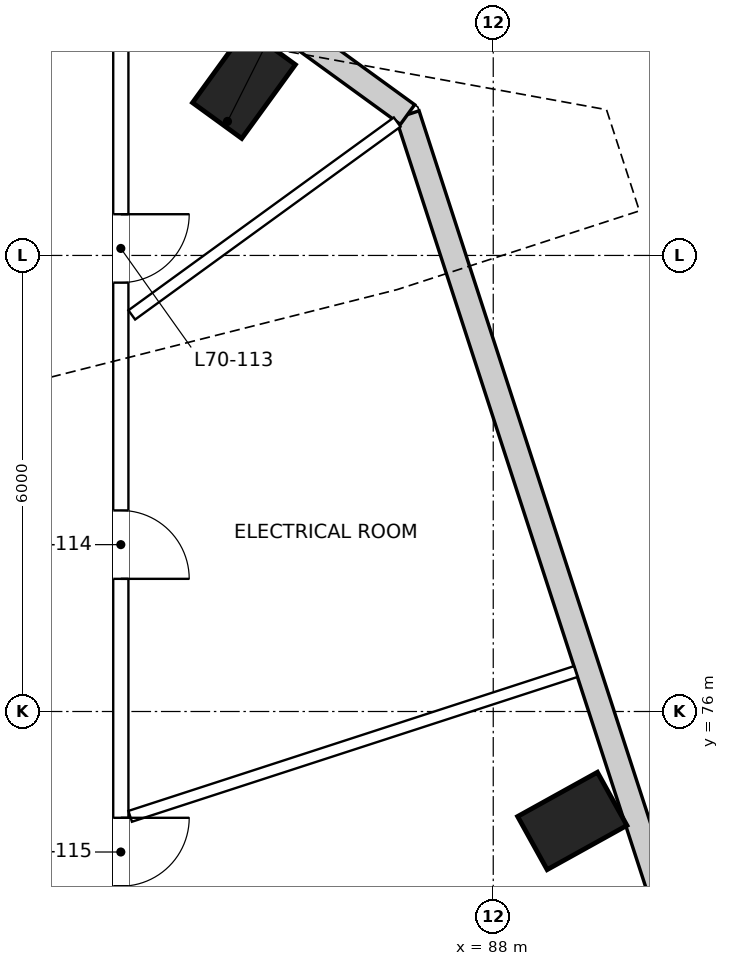
"""IFC4 building model, lengths in metres.
Left out: names, types, materials, properties, quantities, classifications, styles, units other than length and angle.
Written with IfcOpenShell. Run it as: python <this file> out.ifc"""

import sys

from ifc_helpers import new_model, si_unit, direction, frame, frame_2d, origin, origin_2d, place, context, subcontext, project, spatial, rectangle, extrude, element, fill, save


model = new_model("IFC4")
c1 = context("Model", 3, precision=1e-05, world=origin(), true_north=direction((0.0, 1.0)))
c2 = subcontext(c1, "Body", "Model", "MODEL_VIEW")
j1 = project(units=[si_unit("LENGTHUNIT", "METRE"), si_unit("PLANEANGLEUNIT", "RADIAN")], contexts=[c1])
p1 = place(None, origin())
s1 = spatial("IfcSite", under=j1, at=p1, CompositionType="ELEMENT")
p2 = place(p1, origin())
s2 = spatial("IfcBuilding", under=s1, at=p2, CompositionType="ELEMENT")
p3 = place(p2, frame((0.0, 0.0, 295.1)))
s3 = spatial("IfcBuildingStorey", under=s2, at=p3, CompositionType="ELEMENT", Elevation=295.1)
for number, where, z_axis, x_axis in (
    (1, (89.04, 74.56, 0.0), (0.0, 0.0, 1.0), (0.485, -0.875, 0.0)),
    (2, (84.72, 84.26, 0.0), (0.0, 0.0, 1.0), (0.809, -0.588, 0.0)),
):
    element("IfcColumn", number, at=place(p3, frame(where, z_axis=z_axis, x_axis=x_axis)), inside=s3, PredefinedType="COLUMN", context=c2, shape_type="SweptSolid", body=[
        extrude(rectangle(XDim=0.8, YDim=1.2, at=origin_2d()), origin(), (0.0, 0.0, 1.0), 5.0),
    ])
p4 = place(p3, frame((92.529, 66.443, 0.0), z_axis=(0.0, 0.0, 1.0), x_axis=(-0.30902093442, 0.951055236088, 0.0)))
e3 = element("IfcWall", 3, at=p4, inside=s3, PredefinedType="SOLIDWALL", context=c2, shape_type="SweptSolid", body=[
    extrude(rectangle(XDim=18.306, YDim=0.32, at=frame_2d((9.153, 0.0))), origin(), (0.0, 0.0, 1.0), 4.6),
])
p5 = place(p3, frame((86.872, 83.854, 0.0), z_axis=(0.0, 0.0, 1.0), x_axis=(-0.809017735842, 0.587784231749, 0.0)))
e4 = element("IfcWall", 4, at=p5, inside=s3, PredefinedType="SOLIDWALL", context=c2, shape_type="SweptSolid", body=[
    extrude(rectangle(XDim=6.782, YDim=0.32, at=frame_2d((3.391, 0.0))), origin(), (0.0, 0.0, 1.0), 4.6),
])
p6 = place(p3, frame((83.1, 86.396, 0.0), z_axis=(0.0, 0.0, 1.0), x_axis=(0.0, -1.0, 0.0)))
e5 = element("IfcWall", 5, at=p6, inside=s3, PredefinedType="PARTITIONING", context=c2, shape_type="SweptSolid", body=[
    extrude(rectangle(XDim=14.347, YDim=0.2, at=frame_2d((7.173, 0.0))), origin(), (0.0, 0.0, 1.0), 4.15),
])
p7 = place(p6, frame((3.854, 0.0, 0.0)))
e6 = element("IfcOpeningElement", 6, at=p7, cuts=e5, PredefinedType="OPENING", context=c2, shape_type="SweptSolid", body=[
    extrude(rectangle(XDim=0.9, YDim=2.1, at=frame_2d((0.45, 1.05))), frame((0.0, 0.11, 0.0), z_axis=(0.0, -1.0, 0.0), x_axis=(1.0, 0.0, 0.0)), (0.0, 0.0, 1.0), 0.22),
])
p8 = place(p6, frame((7.751, 0.0, 0.0)))
e7 = element("IfcOpeningElement", 7, at=p8, cuts=e5, PredefinedType="OPENING", context=c2, shape_type="SweptSolid", body=[
    extrude(rectangle(XDim=0.9, YDim=2.1, at=frame_2d((0.45, 1.05))), frame((0.0, 0.11, 0.0), z_axis=(0.0, -1.0, 0.0), x_axis=(1.0, 0.0, 0.0)), (0.0, 0.0, 1.0), 0.22),
])
p9 = place(p6, frame((11.795, 0.0, 0.0)))
e8 = element("IfcOpeningElement", 8, at=p9, cuts=e5, PredefinedType="OPENING", context=c2, shape_type="SweptSolid", body=[
    extrude(rectangle(XDim=0.9, YDim=2.1, at=frame_2d((0.45, 1.05))), frame((0.0, 0.11, 0.0), z_axis=(0.0, -1.0, 0.0), x_axis=(1.0, 0.0, 0.0)), (0.0, 0.0, 1.0), 0.22),
])
p10 = place(p3, frame((86.736, 83.754, 0.0), z_axis=(0.0, 0.0, 1.0), x_axis=(-0.809036838554, -0.587757938154, 0.0)))
e9 = element("IfcWall", 9, at=p10, inside=s3, PredefinedType="PARTITIONING", context=c2, shape_type="SweptSolid", body=[
    extrude(rectangle(XDim=4.316, YDim=0.15, at=frame_2d((2.158, 0.0))), origin(), (0.0, 0.0, 1.0), 4.6),
])
p11 = place(p3, frame((89.085, 76.525, 0.0), z_axis=(0.0, 0.0, 1.0), x_axis=(-0.951060263663, -0.309005460926, 0.0)))
e10 = element("IfcWall", 10, at=p11, inside=s3, PredefinedType="PARTITIONING", context=c2, shape_type="SweptSolid", body=[
    extrude(rectangle(XDim=6.164, YDim=0.15, at=frame_2d((3.082, 0.0))), origin(), (0.0, 0.0, 1.0), 4.6),
])
p12 = place(p7, origin())
e11 = element("IfcDoor", 11, at=p12, inside=s3, OperationType="SINGLE_SWING_LEFT", PredefinedType="DOOR", context=c2, shape_type="SweptSolid", body=[
    extrude(rectangle(XDim=0.9, YDim=2.1, at=frame_2d((0.45, 1.05))), frame((0.0, 0.025, 0.0), z_axis=(0.0, -1.0, 0.0), x_axis=(1.0, 0.0, 0.0)), (0.0, 0.0, 1.0), 0.05),
])
fill(e6, e11)
p13 = place(p8, origin())
e12 = element("IfcDoor", 12, at=p13, inside=s3, OperationType="SINGLE_SWING_RIGHT", PredefinedType="DOOR", context=c2, shape_type="SweptSolid", body=[
    extrude(rectangle(XDim=0.9, YDim=2.1, at=frame_2d((0.45, 1.05))), frame((0.0, 0.025, 0.0), z_axis=(0.0, -1.0, 0.0), x_axis=(1.0, 0.0, 0.0)), (0.0, 0.0, 1.0), 0.05),
])
fill(e7, e12)
p14 = place(p9, origin())
e13 = element("IfcDoor", 13, at=p14, inside=s3, OperationType="SINGLE_SWING_LEFT", PredefinedType="DOOR", context=c2, shape_type="SweptSolid", body=[
    extrude(rectangle(XDim=0.9, YDim=2.1, at=frame_2d((0.45, 1.05))), frame((0.0, 0.025, 0.0), z_axis=(0.0, -1.0, 0.0), x_axis=(1.0, 0.0, 0.0)), (0.0, 0.0, 1.0), 0.05),
])
fill(e8, e13)
save(model, sys.argv[1])
